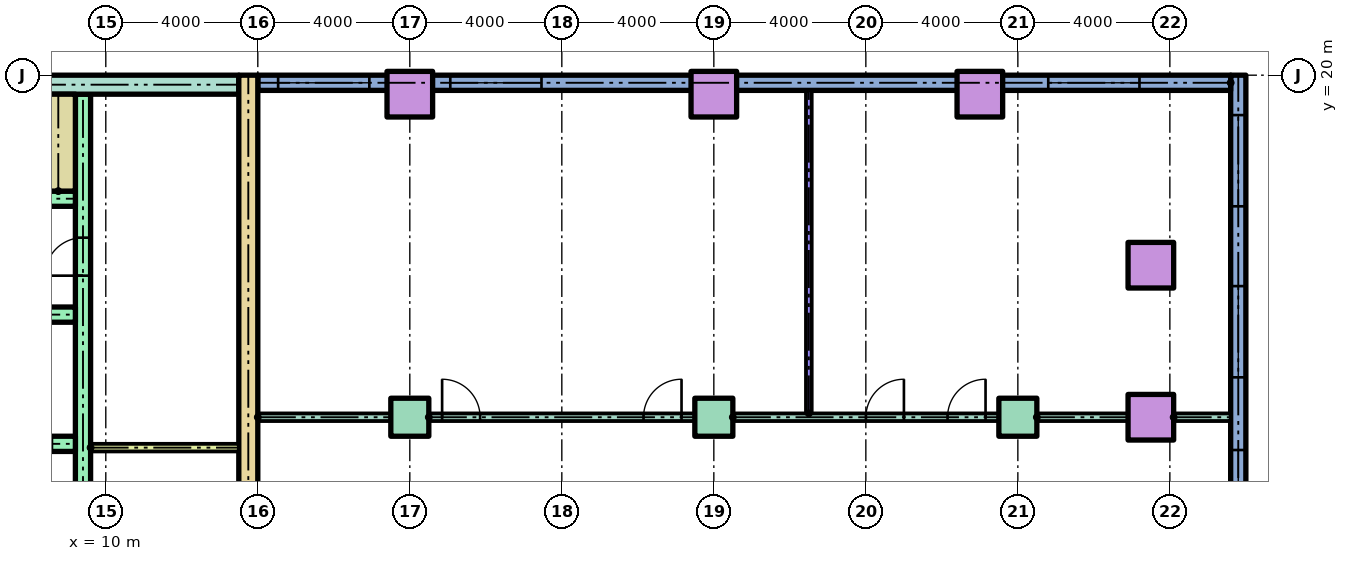
"""IFC4 building model, lengths in metres.
Left out: names, types, materials, properties, quantities, classifications, styles, units other than length and angle.
Written with IfcOpenShell. Run it as: python <this file> out.ifc"""

import sys

from ifc_helpers import new_model, si_unit, direction, frame, frame_2d, origin, origin_2d, place, context, subcontext, project, spatial, rectangle, hollow_rectangle, extrude, element, fill, save


model = new_model("IFC4")
c1 = context("Model", 3, precision=1e-05, world=origin(), true_north=direction((0.0, 1.0)))
c2 = subcontext(c1, "Body", "Model", "MODEL_VIEW")
j1 = project(units=[si_unit("LENGTHUNIT", "METRE"), si_unit("PLANEANGLEUNIT", "RADIAN")], contexts=[c1])
p1 = place(None, origin())
s1 = spatial("IfcSite", under=j1, at=p1, CompositionType="ELEMENT")
p2 = place(p1, origin())
s2 = spatial("IfcBuilding", under=s1, at=p2, CompositionType="ELEMENT")
p3 = place(p2, frame((0.0, 0.0, 22.0)))
s3 = spatial("IfcBuildingStorey", under=s2, at=p3, CompositionType="ELEMENT", Elevation=22.0)
for number, where in (
    (1, (18.0, 11.0, 0.0)),
    (2, (26.0, 11.0, 0.0)),
    (3, (34.0, 11.0, 0.0)),
):
    element("IfcColumn", number, at=place(p3, frame(where)), inside=s3, PredefinedType="COLUMN", context=c2, shape_type="SweptSolid", body=[
        extrude(rectangle(XDim=1.0, YDim=1.0, at=origin_2d()), origin(), (0.0, 0.0, 1.0), 4.0),
    ])
for number, where in (
    (4, (37.5, 11.0, 0.0)),
    (5, (37.5, 15.0, 0.0)),
    (6, (18.0, 19.5, 0.0)),
    (7, (26.0, 19.5, 0.0)),
    (8, (33.0, 19.5, 0.0)),
):
    element("IfcColumn", number, at=place(p3, frame(where)), inside=s3, PredefinedType="COLUMN", context=c2, shape_type="SweptSolid", body=[
        extrude(hollow_rectangle(XDim=1.2, YDim=1.2, WallThickness=0.06, at=origin_2d()), origin(), (0.0, 0.0, 1.0), 4.0),
    ])
p4 = place(p3, frame((39.8, -50.0, 0.0), z_axis=(0.0, 0.0, 1.0), x_axis=(0.0, 1.0, 0.0)))
e9 = element("IfcWall", 9, at=p4, inside=s3, PredefinedType="STANDARD", context=c2, shape_type="SweptSolid", body=[
    extrude(rectangle(XDim=70.0, YDim=0.4, at=frame_2d((35.0, 0.0))), origin(), (0.0, 0.0, 1.0), 3.7),
])
p5 = place(p4, frame((0.75, 0.0, 0.9)))
e10 = element("IfcOpeningElement", 10, at=p5, cuts=e9, PredefinedType="OPENING", context=c2, shape_type="SweptSolid", body=[
    extrude(rectangle(XDim=2.4, YDim=2.1, at=frame_2d((1.2, 1.05))), frame((0.0, 0.21, 0.0), z_axis=(0.0, -1.0, 0.0), x_axis=(1.0, 0.0, 0.0)), (0.0, 0.0, 1.0), 0.42),
])
p6 = place(p4, frame((6.633, 0.0, 0.9)))
e11 = element("IfcOpeningElement", 11, at=p6, cuts=e9, PredefinedType="OPENING", context=c2, shape_type="SweptSolid", body=[
    extrude(rectangle(XDim=2.4, YDim=2.1, at=frame_2d((1.2, 1.05))), frame((0.0, 0.21, 0.0), z_axis=(0.0, -1.0, 0.0), x_axis=(1.0, 0.0, 0.0)), (0.0, 0.0, 1.0), 0.42),
])
p7 = place(p4, frame((10.3, 0.0, 0.9)))
e12 = element("IfcOpeningElement", 12, at=p7, cuts=e9, PredefinedType="OPENING", context=c2, shape_type="SweptSolid", body=[
    extrude(rectangle(XDim=2.4, YDim=2.1, at=frame_2d((1.2, 1.05))), frame((0.0, 0.21, 0.0), z_axis=(0.0, -1.0, 0.0), x_axis=(1.0, 0.0, 0.0)), (0.0, 0.0, 1.0), 0.42),
])
p8 = place(p4, frame((13.967, 0.0, 0.9)))
e13 = element("IfcOpeningElement", 13, at=p8, cuts=e9, PredefinedType="OPENING", context=c2, shape_type="SweptSolid", body=[
    extrude(rectangle(XDim=2.4, YDim=2.1, at=frame_2d((1.2, 1.05))), frame((0.0, 0.21, 0.0), z_axis=(0.0, -1.0, 0.0), x_axis=(1.0, 0.0, 0.0)), (0.0, 0.0, 1.0), 0.42),
])
p9 = place(p4, frame((17.633, 0.0, 0.9)))
e14 = element("IfcOpeningElement", 14, at=p9, cuts=e9, PredefinedType="OPENING", context=c2, shape_type="SweptSolid", body=[
    extrude(rectangle(XDim=2.4, YDim=2.1, at=frame_2d((1.2, 1.05))), frame((0.0, 0.21, 0.0), z_axis=(0.0, -1.0, 0.0), x_axis=(1.0, 0.0, 0.0)), (0.0, 0.0, 1.0), 0.42),
])
p10 = place(p4, frame((21.3, 0.0, 0.9)))
e15 = element("IfcOpeningElement", 15, at=p10, cuts=e9, PredefinedType="OPENING", context=c2, shape_type="SweptSolid", body=[
    extrude(rectangle(XDim=2.4, YDim=2.1, at=frame_2d((1.2, 1.05))), frame((0.0, 0.21, 0.0), z_axis=(0.0, -1.0, 0.0), x_axis=(1.0, 0.0, 0.0)), (0.0, 0.0, 1.0), 0.42),
])
p11 = place(p4, frame((24.967, 0.0, 0.9)))
e16 = element("IfcOpeningElement", 16, at=p11, cuts=e9, PredefinedType="OPENING", context=c2, shape_type="SweptSolid", body=[
    extrude(rectangle(XDim=2.4, YDim=2.1, at=frame_2d((1.2, 1.05))), frame((0.0, 0.21, 0.0), z_axis=(0.0, -1.0, 0.0), x_axis=(1.0, 0.0, 0.0)), (0.0, 0.0, 1.0), 0.42),
])
p12 = place(p4, frame((28.863, 0.0, 0.9)))
e17 = element("IfcOpeningElement", 17, at=p12, cuts=e9, PredefinedType="OPENING", context=c2, shape_type="SweptSolid", body=[
    extrude(rectangle(XDim=2.4, YDim=2.1, at=frame_2d((1.2, 1.05))), frame((0.0, 0.21, 0.0), z_axis=(0.0, -1.0, 0.0), x_axis=(1.0, 0.0, 0.0)), (0.0, 0.0, 1.0), 0.42),
])
p13 = place(p4, frame((32.988, 0.0, 0.9)))
e18 = element("IfcOpeningElement", 18, at=p13, cuts=e9, PredefinedType="OPENING", context=c2, shape_type="SweptSolid", body=[
    extrude(rectangle(XDim=2.4, YDim=2.1, at=frame_2d((1.2, 1.05))), frame((0.0, 0.21, 0.0), z_axis=(0.0, -1.0, 0.0), x_axis=(1.0, 0.0, 0.0)), (0.0, 0.0, 1.0), 0.42),
])
p14 = place(p4, frame((37.113, 0.0, 0.9)))
e19 = element("IfcOpeningElement", 19, at=p14, cuts=e9, PredefinedType="OPENING", context=c2, shape_type="SweptSolid", body=[
    extrude(rectangle(XDim=2.4, YDim=2.1, at=frame_2d((1.2, 1.05))), frame((0.0, 0.21, 0.0), z_axis=(0.0, -1.0, 0.0), x_axis=(1.0, 0.0, 0.0)), (0.0, 0.0, 1.0), 0.42),
])
p15 = place(p4, frame((41.238, 0.0, 0.9)))
e20 = element("IfcOpeningElement", 20, at=p15, cuts=e9, PredefinedType="OPENING", context=c2, shape_type="SweptSolid", body=[
    extrude(rectangle(XDim=2.4, YDim=2.1, at=frame_2d((1.2, 1.05))), frame((0.0, 0.21, 0.0), z_axis=(0.0, -1.0, 0.0), x_axis=(1.0, 0.0, 0.0)), (0.0, 0.0, 1.0), 0.42),
])
p16 = place(p4, frame((45.363, 0.0, 0.9)))
e21 = element("IfcOpeningElement", 21, at=p16, cuts=e9, PredefinedType="OPENING", context=c2, shape_type="SweptSolid", body=[
    extrude(rectangle(XDim=2.4, YDim=2.1, at=frame_2d((1.2, 1.05))), frame((0.0, 0.21, 0.0), z_axis=(0.0, -1.0, 0.0), x_axis=(1.0, 0.0, 0.0)), (0.0, 0.0, 1.0), 0.42),
])
p17 = place(p4, frame((49.488, 0.0, 0.9)))
e22 = element("IfcOpeningElement", 22, at=p17, cuts=e9, PredefinedType="OPENING", context=c2, shape_type="SweptSolid", body=[
    extrude(rectangle(XDim=2.4, YDim=2.1, at=frame_2d((1.2, 1.05))), frame((0.0, 0.21, 0.0), z_axis=(0.0, -1.0, 0.0), x_axis=(1.0, 0.0, 0.0)), (0.0, 0.0, 1.0), 0.42),
])
p18 = place(p4, frame((53.613, 0.0, 0.9)))
e23 = element("IfcOpeningElement", 23, at=p18, cuts=e9, PredefinedType="OPENING", context=c2, shape_type="SweptSolid", body=[
    extrude(rectangle(XDim=2.4, YDim=2.1, at=frame_2d((1.2, 1.05))), frame((0.0, 0.21, 0.0), z_axis=(0.0, -1.0, 0.0), x_axis=(1.0, 0.0, 0.0)), (0.0, 0.0, 1.0), 0.42),
])
p19 = place(p4, frame((57.738, 0.0, 0.9)))
e24 = element("IfcOpeningElement", 24, at=p19, cuts=e9, PredefinedType="OPENING", context=c2, shape_type="SweptSolid", body=[
    extrude(rectangle(XDim=2.4, YDim=2.1, at=frame_2d((1.2, 1.05))), frame((0.0, 0.21, 0.0), z_axis=(0.0, -1.0, 0.0), x_axis=(1.0, 0.0, 0.0)), (0.0, 0.0, 1.0), 0.42),
])
p20 = place(p4, frame((62.05, 0.0, 0.9)))
e25 = element("IfcOpeningElement", 25, at=p20, cuts=e9, PredefinedType="OPENING", context=c2, shape_type="SweptSolid", body=[
    extrude(rectangle(XDim=2.4, YDim=2.1, at=frame_2d((1.2, 1.05))), frame((0.0, 0.21, 0.0), z_axis=(0.0, -1.0, 0.0), x_axis=(1.0, 0.0, 0.0)), (0.0, 0.0, 1.0), 0.42),
])
p21 = place(p4, frame((66.55, 0.0, 0.9)))
e26 = element("IfcOpeningElement", 26, at=p21, cuts=e9, PredefinedType="OPENING", context=c2, shape_type="SweptSolid", body=[
    extrude(rectangle(XDim=2.4, YDim=2.1, at=frame_2d((1.2, 1.05))), frame((0.0, 0.21, 0.0), z_axis=(0.0, -1.0, 0.0), x_axis=(1.0, 0.0, 0.0)), (0.0, 0.0, 1.0), 0.42),
])
p22 = place(p3, frame((39.6, 19.8, 0.0), z_axis=(0.0, 0.0, 1.0), x_axis=(-1.0, 0.0, 0.0)))
e27 = element("IfcWall", 27, at=p22, inside=s3, PredefinedType="STANDARD", context=c2, shape_type="SweptSolid", body=[
    extrude(rectangle(XDim=25.6, YDim=0.4, at=frame_2d((12.8, 0.0))), origin(), (0.0, 0.0, 1.0), 3.7),
])
p23 = place(p22, frame((2.4, 0.0, 0.9)))
e28 = element("IfcOpeningElement", 28, at=p23, cuts=e27, PredefinedType="OPENING", context=c2, shape_type="SweptSolid", body=[
    extrude(rectangle(XDim=2.4, YDim=2.1, at=frame_2d((1.2, 1.05))), frame((0.0, 0.21, 0.0), z_axis=(0.0, -1.0, 0.0), x_axis=(1.0, 0.0, 0.0)), (0.0, 0.0, 1.0), 0.42),
])
p24 = place(p22, frame((18.135, 0.0, 0.9)))
e29 = element("IfcOpeningElement", 29, at=p24, cuts=e27, PredefinedType="OPENING", context=c2, shape_type="SweptSolid", body=[
    extrude(rectangle(XDim=2.4, YDim=2.1, at=frame_2d((1.2, 1.05))), frame((0.0, 0.21, 0.0), z_axis=(0.0, -1.0, 0.0), x_axis=(1.0, 0.0, 0.0)), (0.0, 0.0, 1.0), 0.42),
])
p25 = place(p22, frame((22.665, 0.0, 0.9)))
e30 = element("IfcOpeningElement", 30, at=p25, cuts=e27, PredefinedType="OPENING", context=c2, shape_type="SweptSolid", body=[
    extrude(rectangle(XDim=2.4, YDim=2.1, at=frame_2d((1.2, 1.05))), frame((0.0, 0.21, 0.0), z_axis=(0.0, -1.0, 0.0), x_axis=(1.0, 0.0, 0.0)), (0.0, 0.0, 1.0), 0.42),
])
p26 = place(p3, frame((13.75, 3.0, 0.0), z_axis=(0.0, 0.0, 1.0), x_axis=(0.0, 1.0, 0.0)))
e31 = element("IfcWall", 31, at=p26, inside=s3, PredefinedType="SHEAR", context=c2, shape_type="SweptSolid", body=[
    extrude(rectangle(XDim=17.0, YDim=0.5, at=frame_2d((8.5, 0.0))), origin(), (0.0, 0.0, 1.0), 3.2),
])
p27 = place(p3, frame((-13.5, 19.75, 0.0)))
e32 = element("IfcWall", 32, at=p27, inside=s3, PredefinedType="SHEAR", context=c2, shape_type="SweptSolid", body=[
    extrude(rectangle(XDim=27.0, YDim=0.5, at=frame_2d((13.5, 0.0))), origin(), (0.0, 0.0, 1.0), 3.2),
])
p28 = place(p3, frame((9.4, 6.8, 0.0), z_axis=(0.0, 0.0, 1.0), x_axis=(0.0, 1.0, 0.0)))
e33 = element("IfcWall", 33, at=p28, inside=s3, PredefinedType="SHEAR", context=c2, shape_type="SweptSolid", body=[
    extrude(rectangle(XDim=12.7, YDim=0.4, at=frame_2d((6.35, 0.0))), origin(), (0.0, 0.0, 1.0), 3.2),
])
p29 = place(p28, frame((1.15, 0.0, 0.0)))
e34 = element("IfcOpeningElement", 34, at=p29, cuts=e33, PredefinedType="OPENING", context=c2, shape_type="SweptSolid", body=[
    extrude(rectangle(XDim=1.0, YDim=2.1, at=frame_2d((0.5, 1.05))), frame((0.0, 0.21, 0.0), z_axis=(0.0, -1.0, 0.0), x_axis=(1.0, 0.0, 0.0)), (0.0, 0.0, 1.0), 0.42),
])
p30 = place(p28, frame((7.925, 0.0, 0.0)))
e35 = element("IfcOpeningElement", 35, at=p30, cuts=e33, PredefinedType="OPENING", context=c2, shape_type="SweptSolid", body=[
    extrude(rectangle(XDim=1.0, YDim=2.1, at=frame_2d((0.5, 1.05))), frame((0.0, 0.21, 0.0), z_axis=(0.0, -1.0, 0.0), x_axis=(1.0, 0.0, 0.0)), (0.0, 0.0, 1.0), 0.42),
])
p31 = place(p3, frame((1.2, 10.3, 0.0)))
e36 = element("IfcWall", 36, at=p31, inside=s3, PredefinedType="SHEAR", context=c2, shape_type="SweptSolid", body=[
    extrude(rectangle(XDim=8.0, YDim=0.4, at=frame_2d((4.0, 0.0))), origin(), (0.0, 0.0, 1.0), 3.2),
])
p32 = place(p31, frame((3.55, 0.0, 0.0)))
e37 = element("IfcOpeningElement", 37, at=p32, cuts=e36, PredefinedType="OPENING", context=c2, shape_type="SweptSolid", body=[
    extrude(rectangle(XDim=1.1, YDim=2.1, at=frame_2d((0.55, 1.05))), frame((0.0, 0.21, 0.0), z_axis=(0.0, -1.0, 0.0), x_axis=(1.0, 0.0, 0.0)), (0.0, 0.0, 1.0), 0.42),
])
p33 = place(p31, frame((6.283, 0.0, 0.0)))
e38 = element("IfcOpeningElement", 38, at=p33, cuts=e36, PredefinedType="OPENING", context=c2, shape_type="SweptSolid", body=[
    extrude(rectangle(XDim=1.1, YDim=2.1, at=frame_2d((0.55, 1.05))), frame((0.0, 0.21, 0.0), z_axis=(0.0, -1.0, 0.0), x_axis=(1.0, 0.0, 0.0)), (0.0, 0.0, 1.0), 0.42),
])
p34 = place(p31, frame((0.867, 0.0, 0.0)))
e39 = element("IfcOpeningElement", 39, at=p34, cuts=e36, PredefinedType="OPENING", context=c2, shape_type="SweptSolid", body=[
    extrude(rectangle(XDim=1.0, YDim=2.1, at=frame_2d((0.5, 1.05))), frame((0.0, 0.21, 0.0), z_axis=(0.0, -1.0, 0.0), x_axis=(1.0, 0.0, 0.0)), (0.0, 0.0, 1.0), 0.42),
])
p35 = place(p3, frame((1.2, 13.7, 0.0)))
e40 = element("IfcWall", 40, at=p35, inside=s3, PredefinedType="SHEAR", context=c2, shape_type="SweptSolid", body=[
    extrude(rectangle(XDim=8.0, YDim=0.4, at=frame_2d((4.0, 0.0))), origin(), (0.0, 0.0, 1.0), 3.2),
])
p36 = place(p3, frame((-9.2, 16.75, 0.0)))
e41 = element("IfcWall", 41, at=p36, inside=s3, PredefinedType="SHEAR", context=c2, shape_type="SweptSolid", body=[
    extrude(rectangle(XDim=18.4, YDim=0.4, at=frame_2d((9.2, 0.0))), origin(), (0.0, 0.0, 1.0), 3.2),
])
p37 = place(p36, frame((0.1, 0.0, 0.0)))
e42 = element("IfcOpeningElement", 42, at=p37, cuts=e41, PredefinedType="OPENING", context=c2, shape_type="SweptSolid", body=[
    extrude(rectangle(XDim=0.95, YDim=2.1, at=frame_2d((0.475, 1.05))), frame((0.0, 0.21, 0.0), z_axis=(0.0, -1.0, 0.0), x_axis=(1.0, 0.0, 0.0)), (0.0, 0.0, 1.0), 0.42),
])
p38 = place(p36, frame((6.1, 0.0, 0.0)))
e43 = element("IfcOpeningElement", 43, at=p38, cuts=e41, PredefinedType="OPENING", context=c2, shape_type="SweptSolid", body=[
    extrude(rectangle(XDim=0.95, YDim=2.1, at=frame_2d((0.475, 1.05))), frame((0.0, 0.21, 0.0), z_axis=(0.0, -1.0, 0.0), x_axis=(1.0, 0.0, 0.0)), (0.0, 0.0, 1.0), 0.42),
])
p39 = place(p36, frame((12.1, 0.0, 0.0)))
e44 = element("IfcOpeningElement", 44, at=p39, cuts=e41, PredefinedType="OPENING", context=c2, shape_type="SweptSolid", body=[
    extrude(rectangle(XDim=0.95, YDim=2.1, at=frame_2d((0.475, 1.05))), frame((0.0, 0.21, 0.0), z_axis=(0.0, -1.0, 0.0), x_axis=(1.0, 0.0, 0.0)), (0.0, 0.0, 1.0), 0.42),
])
p40 = place(p3, frame((8.75, 16.95, 0.0), z_axis=(0.0, 0.0, 1.0), x_axis=(0.0, 1.0, 0.0)))
e45 = element("IfcWall", 45, at=p40, inside=s3, PredefinedType="SHEAR", context=c2, shape_type="SweptSolid", body=[
    extrude(rectangle(XDim=2.55, YDim=0.9, at=frame_2d((1.275, 0.0))), origin(), (0.0, 0.0, 1.0), 3.2),
])
p41 = place(p3, frame((9.6, 10.2, 0.0)))
e46 = element("IfcWall", 46, at=p41, inside=s3, PredefinedType="PARTITIONING", context=c2, shape_type="SweptSolid", body=[
    extrude(rectangle(XDim=3.9, YDim=0.2, at=frame_2d((1.95, 0.0))), origin(), (0.0, 0.0, 1.0), 3.2),
])
p42 = place(p3, frame((14.0, 11.0, 0.0)))
e47 = element("IfcWall", 47, at=p42, inside=s3, PredefinedType="PARTITIONING", context=c2, shape_type="SweptSolid", body=[
    extrude(rectangle(XDim=3.5, YDim=0.2, at=frame_2d((1.75, 0.0))), origin(), (0.0, 0.0, 1.0), 3.2),
])
p43 = place(p3, frame((18.5, 11.0, 0.0)))
e48 = element("IfcWall", 48, at=p43, inside=s3, PredefinedType="PARTITIONING", context=c2, shape_type="SweptSolid", body=[
    extrude(rectangle(XDim=7.0, YDim=0.2, at=frame_2d((3.5, 0.0))), origin(), (0.0, 0.0, 1.0), 3.2),
])
p44 = place(p43, frame((0.35, 0.0, 0.0)))
e49 = element("IfcOpeningElement", 49, at=p44, cuts=e48, PredefinedType="OPENING", context=c2, shape_type="SweptSolid", body=[
    extrude(rectangle(XDim=1.0, YDim=2.1, at=frame_2d((0.5, 1.05))), frame((0.0, 0.11, 0.0), z_axis=(0.0, -1.0, 0.0), x_axis=(1.0, 0.0, 0.0)), (0.0, 0.0, 1.0), 0.22),
])
p45 = place(p43, frame((5.65, 0.0, 0.0)))
e50 = element("IfcOpeningElement", 50, at=p45, cuts=e48, PredefinedType="OPENING", context=c2, shape_type="SweptSolid", body=[
    extrude(rectangle(XDim=1.0, YDim=2.1, at=frame_2d((0.5, 1.05))), frame((0.0, 0.11, 0.0), z_axis=(0.0, -1.0, 0.0), x_axis=(1.0, 0.0, 0.0)), (0.0, 0.0, 1.0), 0.22),
])
p46 = place(p3, frame((26.5, 11.0, 0.0)))
e51 = element("IfcWall", 51, at=p46, inside=s3, PredefinedType="PARTITIONING", context=c2, shape_type="SweptSolid", body=[
    extrude(rectangle(XDim=7.0, YDim=0.2, at=frame_2d((3.5, 0.0))), origin(), (0.0, 0.0, 1.0), 3.2),
])
p47 = place(p46, frame((3.502, 0.0, 0.0)))
e52 = element("IfcOpeningElement", 52, at=p47, cuts=e51, PredefinedType="OPENING", context=c2, shape_type="SweptSolid", body=[
    extrude(rectangle(XDim=1.0, YDim=2.1, at=frame_2d((0.5, 1.05))), frame((0.0, 0.11, 0.0), z_axis=(0.0, -1.0, 0.0), x_axis=(1.0, 0.0, 0.0)), (0.0, 0.0, 1.0), 0.22),
])
p48 = place(p46, frame((5.65, 0.0, 0.0)))
e53 = element("IfcOpeningElement", 53, at=p48, cuts=e51, PredefinedType="OPENING", context=c2, shape_type="SweptSolid", body=[
    extrude(rectangle(XDim=1.0, YDim=2.1, at=frame_2d((0.5, 1.05))), frame((0.0, 0.11, 0.0), z_axis=(0.0, -1.0, 0.0), x_axis=(1.0, 0.0, 0.0)), (0.0, 0.0, 1.0), 0.22),
])
p49 = place(p3, frame((34.5, 11.0, 0.0)))
e54 = element("IfcWall", 54, at=p49, inside=s3, PredefinedType="PARTITIONING", context=c2, shape_type="SweptSolid", body=[
    extrude(rectangle(XDim=2.4, YDim=0.2, at=frame_2d((1.2, 0.0))), origin(), (0.0, 0.0, 1.0), 3.2),
])
p50 = place(p3, frame((38.1, 11.0, 0.0)))
e55 = element("IfcWall", 55, at=p50, inside=s3, PredefinedType="PARTITIONING", context=c2, shape_type="SweptSolid", body=[
    extrude(rectangle(XDim=1.5, YDim=0.2, at=frame_2d((0.75, 0.0))), origin(), (0.0, 0.0, 1.0), 3.2),
])
p51 = place(p3, frame((28.5, 11.1, 0.0), z_axis=(0.0, 0.0, 1.0), x_axis=(0.0, 1.0, 0.0)))
e56 = element("IfcWall", 56, at=p51, inside=s3, PredefinedType="PARTITIONING", context=c2, shape_type="SweptSolid", body=[
    extrude(rectangle(XDim=8.5, YDim=0.15, at=frame_2d((4.25, 0.0))), origin(), (0.0, 0.0, 1.0), 3.2),
])
p52 = place(p19, origin())
e57 = element("IfcWindow", 57, at=p52, inside=s3, PartitioningType="SINGLE_PANEL", PredefinedType="WINDOW", context=c2, shape_type="SweptSolid", body=[
    extrude(rectangle(XDim=2.4, YDim=2.1, at=frame_2d((1.2, 1.05))), frame((0.0, 0.03, 0.0), z_axis=(0.0, -1.0, 0.0), x_axis=(1.0, 0.0, 0.0)), (0.0, 0.0, 1.0), 0.06),
])
fill(e24, e57)
p53 = place(p20, origin())
e58 = element("IfcWindow", 58, at=p53, inside=s3, PartitioningType="SINGLE_PANEL", PredefinedType="WINDOW", context=c2, shape_type="SweptSolid", body=[
    extrude(rectangle(XDim=2.4, YDim=2.1, at=frame_2d((1.2, 1.05))), frame((0.0, 0.03, 0.0), z_axis=(0.0, -1.0, 0.0), x_axis=(1.0, 0.0, 0.0)), (0.0, 0.0, 1.0), 0.06),
])
fill(e25, e58)
p54 = place(p21, origin())
e59 = element("IfcWindow", 59, at=p54, inside=s3, PartitioningType="SINGLE_PANEL", PredefinedType="WINDOW", context=c2, shape_type="SweptSolid", body=[
    extrude(rectangle(XDim=2.4, YDim=2.1, at=frame_2d((1.2, 1.05))), frame((0.0, 0.03, 0.0), z_axis=(0.0, -1.0, 0.0), x_axis=(1.0, 0.0, 0.0)), (0.0, 0.0, 1.0), 0.06),
])
fill(e26, e59)
p55 = place(p23, origin())
e60 = element("IfcWindow", 60, at=p55, inside=s3, PartitioningType="SINGLE_PANEL", PredefinedType="WINDOW", context=c2, shape_type="SweptSolid", body=[
    extrude(rectangle(XDim=2.4, YDim=2.1, at=frame_2d((1.2, 1.05))), frame((0.0, 0.03, 0.0), z_axis=(0.0, -1.0, 0.0), x_axis=(1.0, 0.0, 0.0)), (0.0, 0.0, 1.0), 0.06),
])
fill(e28, e60)
p56 = place(p24, origin())
e61 = element("IfcWindow", 61, at=p56, inside=s3, PartitioningType="SINGLE_PANEL", PredefinedType="WINDOW", context=c2, shape_type="SweptSolid", body=[
    extrude(rectangle(XDim=2.4, YDim=2.1, at=frame_2d((1.2, 1.05))), frame((0.0, 0.03, 0.0), z_axis=(0.0, -1.0, 0.0), x_axis=(1.0, 0.0, 0.0)), (0.0, 0.0, 1.0), 0.06),
])
fill(e29, e61)
p57 = place(p25, origin())
e62 = element("IfcWindow", 62, at=p57, inside=s3, PartitioningType="SINGLE_PANEL", PredefinedType="WINDOW", context=c2, shape_type="SweptSolid", body=[
    extrude(rectangle(XDim=2.4, YDim=2.1, at=frame_2d((1.2, 1.05))), frame((0.0, 0.03, 0.0), z_axis=(0.0, -1.0, 0.0), x_axis=(1.0, 0.0, 0.0)), (0.0, 0.0, 1.0), 0.06),
])
fill(e30, e62)
p58 = place(p30, origin())
e63 = element("IfcDoor", 63, at=p58, inside=s3, OperationType="SINGLE_SWING_LEFT", PredefinedType="DOOR", context=c2, shape_type="SweptSolid", body=[
    extrude(rectangle(XDim=1.0, YDim=2.1, at=frame_2d((0.5, 1.05))), frame((0.0, 0.025, 0.0), z_axis=(0.0, -1.0, 0.0), x_axis=(1.0, 0.0, 0.0)), (0.0, 0.0, 1.0), 0.05),
])
fill(e35, e63)
p59 = place(p44, origin())
e64 = element("IfcDoor", 64, at=p59, inside=s3, OperationType="SINGLE_SWING_LEFT", PredefinedType="DOOR", context=c2, shape_type="SweptSolid", body=[
    extrude(rectangle(XDim=1.0, YDim=2.1, at=frame_2d((0.5, 1.05))), frame((0.0, 0.025, 0.0), z_axis=(0.0, -1.0, 0.0), x_axis=(1.0, 0.0, 0.0)), (0.0, 0.0, 1.0), 0.05),
])
fill(e49, e64)
p60 = place(p45, origin())
e65 = element("IfcDoor", 65, at=p60, inside=s3, OperationType="SINGLE_SWING_RIGHT", PredefinedType="DOOR", context=c2, shape_type="SweptSolid", body=[
    extrude(rectangle(XDim=1.0, YDim=2.1, at=frame_2d((0.5, 1.05))), frame((0.0, 0.025, 0.0), z_axis=(0.0, -1.0, 0.0), x_axis=(1.0, 0.0, 0.0)), (0.0, 0.0, 1.0), 0.05),
])
fill(e50, e65)
p61 = place(p47, origin())
e66 = element("IfcDoor", 66, at=p61, inside=s3, OperationType="SINGLE_SWING_RIGHT", PredefinedType="DOOR", context=c2, shape_type="SweptSolid", body=[
    extrude(rectangle(XDim=1.0, YDim=2.1, at=frame_2d((0.5, 1.05))), frame((0.0, 0.025, 0.0), z_axis=(0.0, -1.0, 0.0), x_axis=(1.0, 0.0, 0.0)), (0.0, 0.0, 1.0), 0.05),
])
fill(e52, e66)
p62 = place(p48, origin())
e67 = element("IfcDoor", 67, at=p62, inside=s3, OperationType="SINGLE_SWING_RIGHT", PredefinedType="DOOR", context=c2, shape_type="SweptSolid", body=[
    extrude(rectangle(XDim=1.0, YDim=2.1, at=frame_2d((0.5, 1.05))), frame((0.0, 0.025, 0.0), z_axis=(0.0, -1.0, 0.0), x_axis=(1.0, 0.0, 0.0)), (0.0, 0.0, 1.0), 0.05),
])
fill(e53, e67)
save(model, sys.argv[1])
